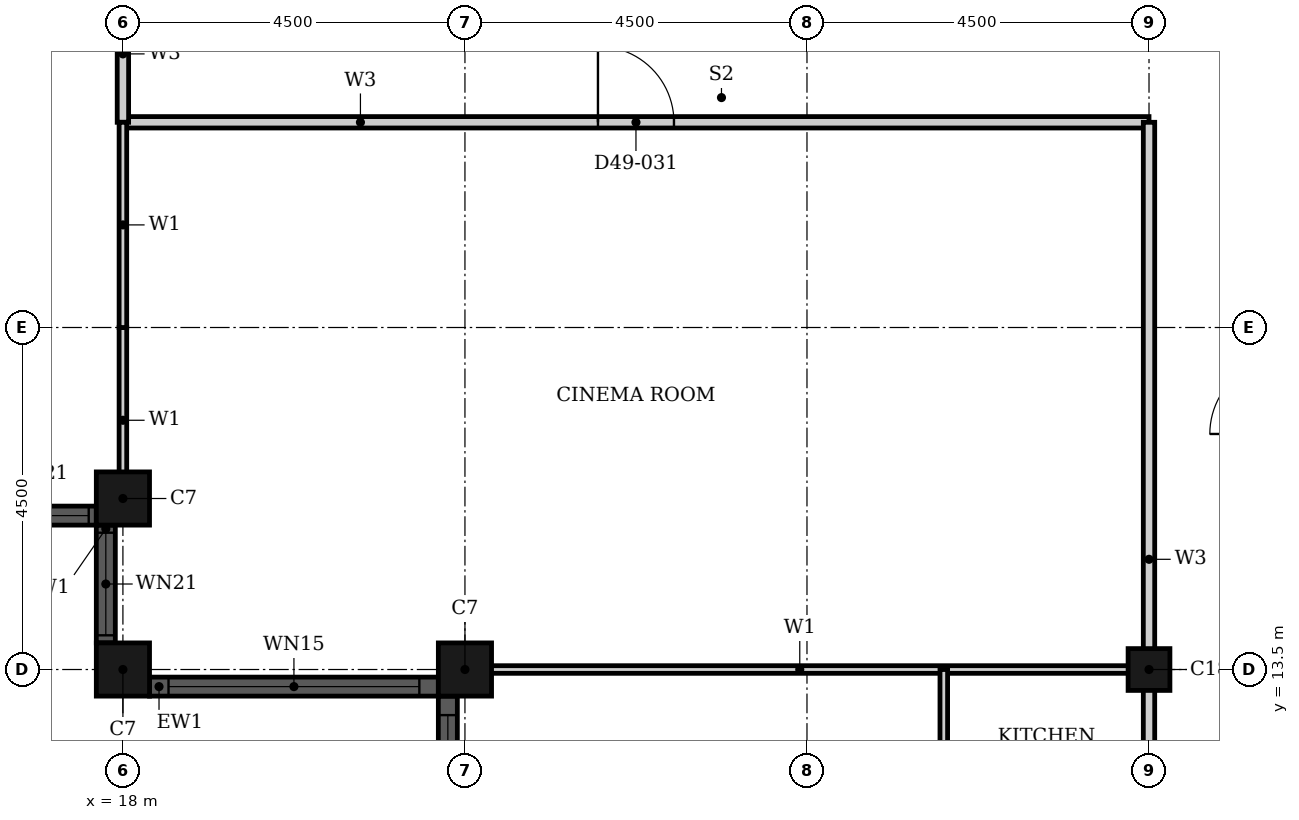
"""IFC4 building model, lengths in metres.
Left out: names, types, materials, properties, quantities, classifications, styles, units other than length and angle.
Written with IfcOpenShell. Run it as: python <this file> out.ifc"""

import sys

from ifc_helpers import new_model, si_unit, direction, frame, frame_2d, origin, origin_2d, place, context, subcontext, project, spatial, rectangle, hollow_rectangle, extrude, element, fill, save


model = new_model("IFC4")
c1 = context("Model", 3, precision=1e-05, world=origin(), true_north=direction((0.0, 1.0)))
c2 = subcontext(c1, "Body", "Model", "MODEL_VIEW")
j1 = project(units=[si_unit("LENGTHUNIT", "METRE"), si_unit("PLANEANGLEUNIT", "RADIAN")], contexts=[c1])
p1 = place(None, origin())
s1 = spatial("IfcSite", under=j1, at=p1, CompositionType="ELEMENT")
p2 = place(p1, origin())
s2 = spatial("IfcBuilding", under=s1, at=p2, CompositionType="ELEMENT")
p3 = place(p2, frame((0.0, 0.0, 196.1)))
s3 = spatial("IfcBuildingStorey", under=s2, at=p3, CompositionType="ELEMENT", Elevation=196.1)
for number, where, z_axis, x_axis in (
    (1, (18.0, 15.75, 0.0), (0.0, 0.0, 1.0), (1.0, 0.0, 0.0)),
    (2, (18.0, 13.5, 0.0), (0.0, 0.0, 1.0), (1.0, 0.0, 0.0)),
    (3, (22.5, 13.5, 0.0), (0.0, 0.0, 1.0), (1.0, 0.0, 0.0)),
):
    element("IfcColumn", number, at=place(p3, frame(where, z_axis=z_axis, x_axis=x_axis)), inside=s3, PredefinedType="COLUMN", context=c2, shape_type="SweptSolid", body=[
        extrude(hollow_rectangle(XDim=0.7, YDim=0.7, WallThickness=0.022, at=origin_2d()), origin(), (0.0, 0.0, 1.0), 3.7),
    ])
p4 = place(p3, frame((31.5, 13.5, 0.0), z_axis=(0.0, 0.0, 1.0), x_axis=(1.0, 0.0, 0.0)))
e4 = element("IfcColumn", 4, at=p4, inside=s3, PredefinedType="COLUMN", context=c2, shape_type="SweptSolid", body=[
    extrude(hollow_rectangle(XDim=0.55, YDim=0.55, WallThickness=0.018, at=origin_2d()), origin(), (0.0, 0.0, 1.0), 3.7),
])
p5 = place(p3, frame((16.1, 15.525, 0.0), z_axis=(0.0, 0.0, 1.0), x_axis=(1.0, 0.0, 0.0)))
e5 = element("IfcWall", 5, at=p5, inside=s3, PredefinedType="SOLIDWALL", context=c2, shape_type="SweptSolid", body=[
    extrude(rectangle(XDim=1.55, YDim=0.25, at=frame_2d((0.775, 0.0))), origin(), (0.0, 0.0, 1.0), 3.7),
])
p6 = place(p5, frame((0.1, 0.0, 0.9)))
e6 = element("IfcOpeningElement", 6, at=p6, cuts=e5, PredefinedType="OPENING", context=c2, shape_type="SweptSolid", body=[
    extrude(rectangle(XDim=1.35, YDim=1.85, at=frame_2d((0.675, 0.925))), frame((0.0, 0.135, 0.0), z_axis=(0.0, -1.0, 0.0), x_axis=(1.0, 0.0, 0.0)), (0.0, 0.0, 1.0), 0.27),
])
p7 = place(p3, frame((17.775, 15.4, 0.0), z_axis=(0.0, 0.0, 1.0), x_axis=(0.0, -1.0, 0.0)))
e7 = element("IfcWall", 7, at=p7, inside=s3, PredefinedType="SOLIDWALL", context=c2, shape_type="SweptSolid", body=[
    extrude(rectangle(XDim=1.55, YDim=0.25, at=frame_2d((0.775, 0.0))), origin(), (0.0, 0.0, 1.0), 3.7),
])
p8 = place(p7, frame((0.1, 0.0, 0.9)))
e8 = element("IfcOpeningElement", 8, at=p8, cuts=e7, PredefinedType="OPENING", context=c2, shape_type="SweptSolid", body=[
    extrude(rectangle(XDim=1.35, YDim=1.85, at=frame_2d((0.675, 0.925))), frame((0.0, 0.135, 0.0), z_axis=(0.0, -1.0, 0.0), x_axis=(1.0, 0.0, 0.0)), (0.0, 0.0, 1.0), 0.27),
])
p9 = place(p3, frame((18.35, 13.275, 0.0), z_axis=(0.0, 0.0, 1.0), x_axis=(1.0, 0.0, 0.0)))
e9 = element("IfcWall", 9, at=p9, inside=s3, PredefinedType="SOLIDWALL", context=c2, shape_type="SweptSolid", body=[
    extrude(rectangle(XDim=3.8, YDim=0.25, at=frame_2d((1.9, 0.0))), origin(), (0.0, 0.0, 1.0), 3.7),
])
p10 = place(p9, frame((0.25, 0.0, 0.45)))
e10 = element("IfcOpeningElement", 10, at=p10, cuts=e9, PredefinedType="OPENING", context=c2, shape_type="SweptSolid", body=[
    extrude(rectangle(XDim=3.3, YDim=2.3, at=frame_2d((1.65, 1.15))), frame((0.0, 0.135, 0.0), z_axis=(0.0, -1.0, 0.0), x_axis=(1.0, 0.0, 0.0)), (0.0, 0.0, 1.0), 0.27),
])
p11 = place(p3, frame((22.275, 13.15, 0.0), z_axis=(0.0, 0.0, 1.0), x_axis=(0.0, -1.0, 0.0)))
e11 = element("IfcWall", 11, at=p11, inside=s3, PredefinedType="SOLIDWALL", context=c2, shape_type="SweptSolid", body=[
    extrude(rectangle(XDim=8.3, YDim=0.25, at=frame_2d((4.15, 0.0))), origin(), (0.0, 0.0, 1.0), 3.7),
])
p12 = place(p11, frame((0.25, 0.0, 0.45)))
e12 = element("IfcOpeningElement", 12, at=p12, cuts=e11, PredefinedType="OPENING", context=c2, shape_type="SweptSolid", body=[
    extrude(rectangle(XDim=3.3, YDim=2.3, at=frame_2d((1.65, 1.15))), frame((0.0, 0.135, 0.0), z_axis=(0.0, -1.0, 0.0), x_axis=(1.0, 0.0, 0.0)), (0.0, 0.0, 1.0), 0.27),
])
p13 = place(p11, frame((4.75, 0.0, 0.45)))
e13 = element("IfcOpeningElement", 13, at=p13, cuts=e11, PredefinedType="OPENING", context=c2, shape_type="SweptSolid", body=[
    extrude(rectangle(XDim=3.3, YDim=2.3, at=frame_2d((1.65, 1.15))), frame((0.0, 0.135, 0.0), z_axis=(0.0, -1.0, 0.0), x_axis=(1.0, 0.0, 0.0)), (0.0, 0.0, 1.0), 0.27),
])
p14 = place(p3, frame((18.0, 20.7, 0.0), z_axis=(0.0, 0.0, 1.0), x_axis=(1.0, 0.0, 0.0)))
e14 = element("IfcWall", 14, at=p14, inside=s3, PredefinedType="PARTITIONING", context=c2, shape_type="SweptSolid", body=[
    extrude(rectangle(XDim=13.5, YDim=0.15, at=frame_2d((6.75, 0.0))), origin(), (0.0, 0.0, 1.0), 3.4),
])
p15 = place(p14, frame((6.25, 0.0, 0.0)))
e15 = element("IfcOpeningElement", 15, at=p15, cuts=e14, PredefinedType="OPENING", context=c2, shape_type="SweptSolid", body=[
    extrude(rectangle(XDim=1.0, YDim=2.1, at=frame_2d((0.5, 1.05))), frame((0.0, 0.085, 0.0), z_axis=(0.0, -1.0, 0.0), x_axis=(1.0, 0.0, 0.0)), (0.0, 0.0, 1.0), 0.17),
])
p16 = place(p3, frame((18.0, 20.7, 0.0), z_axis=(0.0, 0.0, 1.0), x_axis=(0.0, 1.0, 0.0)))
e16 = element("IfcWall", 16, at=p16, inside=s3, PredefinedType="PARTITIONING", context=c2, shape_type="SweptSolid", body=[
    extrude(rectangle(XDim=1.8, YDim=0.15, at=frame_2d((0.9, 0.0))), origin(), (0.0, 0.0, 1.0), 3.4),
])
p17 = place(p3, frame((31.5, 6.9, 0.0), z_axis=(0.0, 0.0, 1.0), x_axis=(0.0, 1.0, 0.0)))
e17 = element("IfcWall", 17, at=p17, inside=s3, PredefinedType="PARTITIONING", context=c2, shape_type="SweptSolid", body=[
    extrude(rectangle(XDim=13.8, YDim=0.15, at=frame_2d((6.9, 0.0))), origin(), (0.0, 0.0, 1.0), 2.68),
])
p18 = place(p17, frame((1.3, 0.0, 0.0)))
e18 = element("IfcOpeningElement", 18, at=p18, cuts=e17, PredefinedType="OPENING", context=c2, shape_type="SweptSolid", body=[
    extrude(rectangle(XDim=1.0, YDim=2.2, at=frame_2d((0.5, 1.1))), frame((0.0, 0.085, 0.0), z_axis=(0.0, -1.0, 0.0), x_axis=(1.0, 0.0, 0.0)), (0.0, 0.0, 1.0), 0.17),
])
p19 = place(p3, frame((22.31, 13.5, 0.0), z_axis=(0.0, 0.0, 1.0), x_axis=(1.0, 0.0, 0.0)))
e19 = element("IfcWall", 19, at=p19, inside=s3, PredefinedType="PARTITIONING", context=c2, shape_type="SweptSolid", body=[
    extrude(rectangle(XDim=9.19, YDim=0.1, at=frame_2d((4.595, 0.0))), origin(), (0.0, 0.0, 1.0), 2.48),
])
p20 = place(p3, frame((18.0, 15.56, 0.0), z_axis=(0.0, 0.0, 1.0), x_axis=(0.0, 1.0, 0.0)))
e20 = element("IfcWall", 20, at=p20, inside=s3, PredefinedType="PARTITIONING", context=c2, shape_type="SweptSolid", body=[
    extrude(rectangle(XDim=2.439, YDim=0.1, at=frame_2d((1.219, 0.0))), origin(), (0.0, 0.0, 1.0), 3.4),
])
p21 = place(p3, frame((18.0, 18.0, 0.0), z_axis=(0.0, 0.0, 1.0), x_axis=(0.0, 1.0, 0.0)))
e21 = element("IfcWall", 21, at=p21, inside=s3, PredefinedType="PARTITIONING", context=c2, shape_type="SweptSolid", body=[
    extrude(rectangle(XDim=2.7, YDim=0.1, at=frame_2d((1.35, 0.0))), origin(), (0.0, 0.0, 1.0), 3.4),
])
p22 = place(p3, frame((28.8, 10.5, 0.0), z_axis=(0.0, 0.0, 1.0), x_axis=(0.0, 1.0, 0.0)))
e22 = element("IfcWall", 22, at=p22, inside=s3, PredefinedType="PARTITIONING", context=c2, shape_type="SweptSolid", body=[
    extrude(rectangle(XDim=3.0, YDim=0.1, at=frame_2d((1.5, 0.0))), origin(), (0.0, 0.0, 1.0), 3.4),
])
p23 = place(p22, frame((1.05, 0.0, 0.0)))
e23 = element("IfcOpeningElement", 23, at=p23, cuts=e22, PredefinedType="OPENING", context=c2, shape_type="SweptSolid", body=[
    extrude(rectangle(XDim=0.9, YDim=2.1, at=frame_2d((0.45, 1.05))), frame((0.0, 0.06, 0.0), z_axis=(0.0, -1.0, 0.0), x_axis=(1.0, 0.0, 0.0)), (0.0, 0.0, 1.0), 0.12),
])
p24 = place(p6, origin())
e24 = element("IfcWindow", 24, at=p24, inside=s3, PartitioningType="SINGLE_PANEL", PredefinedType="WINDOW", context=c2, shape_type="SweptSolid", body=[
    extrude(rectangle(XDim=1.35, YDim=1.85, at=frame_2d((0.675, 0.925))), frame((0.0, 0.03, 0.0), z_axis=(0.0, -1.0, 0.0), x_axis=(1.0, 0.0, 0.0)), (0.0, 0.0, 1.0), 0.06),
])
fill(e6, e24)
p25 = place(p8, origin())
e25 = element("IfcWindow", 25, at=p25, inside=s3, PartitioningType="SINGLE_PANEL", PredefinedType="WINDOW", context=c2, shape_type="SweptSolid", body=[
    extrude(rectangle(XDim=1.35, YDim=1.85, at=frame_2d((0.675, 0.925))), frame((0.0, 0.03, 0.0), z_axis=(0.0, -1.0, 0.0), x_axis=(1.0, 0.0, 0.0)), (0.0, 0.0, 1.0), 0.06),
])
fill(e8, e25)
p26 = place(p10, origin())
e26 = element("IfcWindow", 26, at=p26, inside=s3, PartitioningType="SINGLE_PANEL", PredefinedType="WINDOW", context=c2, shape_type="SweptSolid", body=[
    extrude(rectangle(XDim=3.3, YDim=2.3, at=frame_2d((1.65, 1.15))), frame((0.0, 0.03, 0.0), z_axis=(0.0, -1.0, 0.0), x_axis=(1.0, 0.0, 0.0)), (0.0, 0.0, 1.0), 0.06),
])
fill(e10, e26)
p27 = place(p12, origin())
e27 = element("IfcWindow", 27, at=p27, inside=s3, PartitioningType="SINGLE_PANEL", PredefinedType="WINDOW", context=c2, shape_type="SweptSolid", body=[
    extrude(rectangle(XDim=3.3, YDim=2.3, at=frame_2d((1.65, 1.15))), frame((0.0, 0.03, 0.0), z_axis=(0.0, -1.0, 0.0), x_axis=(1.0, 0.0, 0.0)), (0.0, 0.0, 1.0), 0.06),
])
fill(e12, e27)
p28 = place(p15, origin())
e28 = element("IfcDoor", 28, at=p28, inside=s3, OperationType="SINGLE_SWING_RIGHT", PredefinedType="DOOR", context=c2, shape_type="SweptSolid", body=[
    extrude(rectangle(XDim=1.0, YDim=2.1, at=frame_2d((0.5, 1.05))), frame((0.0, 0.025, 0.0), z_axis=(0.0, -1.0, 0.0), x_axis=(1.0, 0.0, 0.0)), (0.0, 0.0, 1.0), 0.05),
])
fill(e15, e28)
save(model, sys.argv[1])
